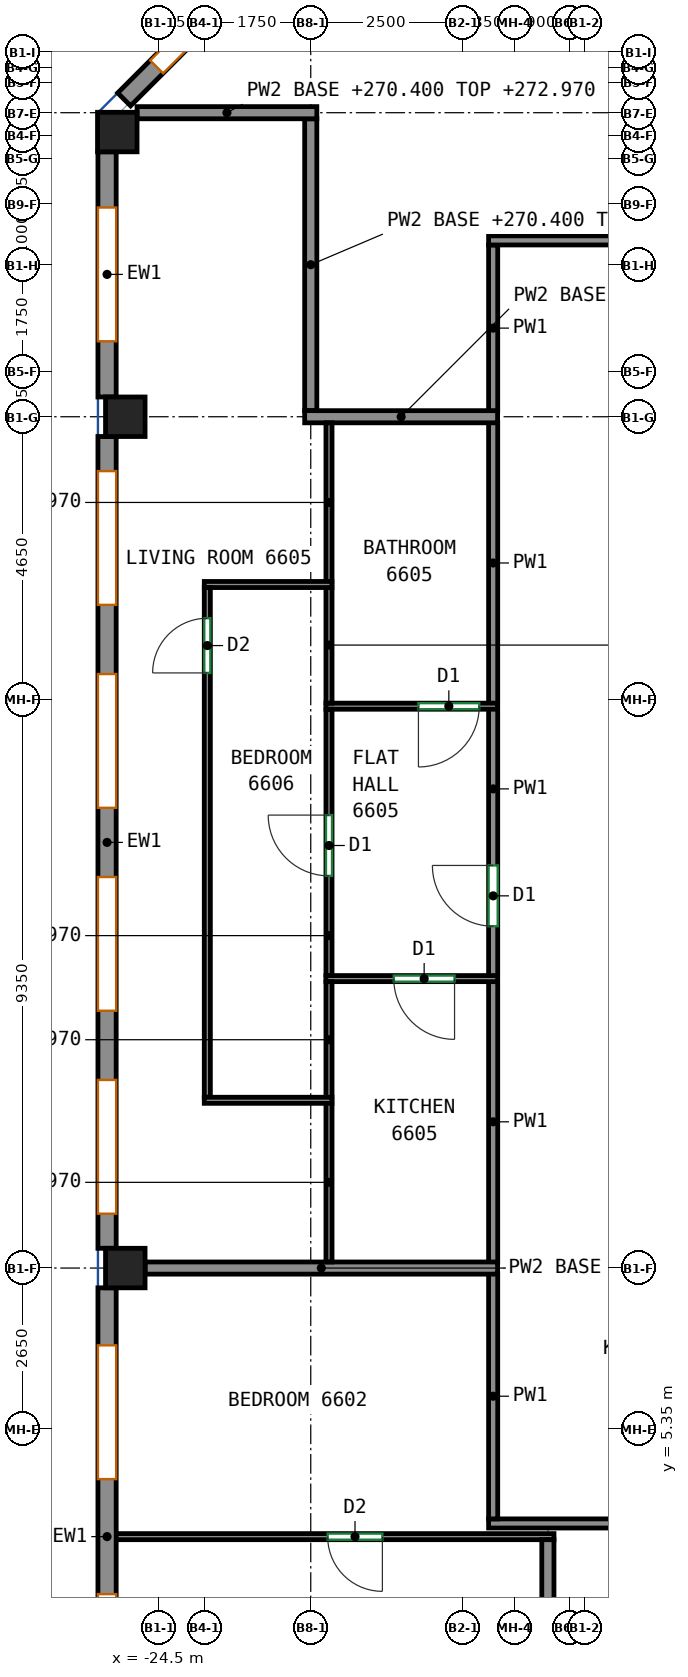
"""IFC4 building model, lengths in metres.
Left out: names, types, materials, properties, quantities, classifications, styles, units other than length and angle.
Written with IfcOpenShell. Run it as: python <this file> out.ifc"""

import sys

from ifc_helpers import new_model, si_unit, direction, frame, frame_2d, origin, origin_2d, place, context, subcontext, project, spatial, rectangle, extrude, source, transform, mapped, element, fill, save


model = new_model("IFC4")
c1 = context("Model", 3, precision=1e-05, world=origin(), true_north=direction((0.0, 1.0)))
c2 = subcontext(c1, "Body", "Model", "MODEL_VIEW")
j1 = project(units=[si_unit("LENGTHUNIT", "METRE"), si_unit("PLANEANGLEUNIT", "RADIAN")], contexts=[c1])
p1 = place(None, origin())
s1 = spatial("IfcSite", under=j1, at=p1, CompositionType="ELEMENT")
p2 = place(p1, origin())
s2 = spatial("IfcBuilding", under=s1, at=p2, CompositionType="ELEMENT")
p3 = place(p2, frame((0.0, 0.0, 270.4)))
s3 = spatial("IfcBuildingStorey", under=s2, at=p3, CompositionType="ELEMENT", Elevation=270.4)
m1 = source(origin(), c2, "Body", "SweptSolid", [
    extrude(rectangle(XDim=0.65, YDim=0.65, at=origin_2d()), origin(), (0.0, 0.0, 1.0), 3.12),
])
for number, where, z_axis, x_axis in (
    (1, (-25.182, 26.682, 0.0), (0.0, 0.0, 1.0), (1.0, 0.0, 0.0)),
    (2, (-25.05, 8.0, 0.0), (0.0, 0.0, 1.0), (1.0, 0.0, 0.0)),
    (3, (-25.05, 22.0, 0.0), (0.0, 0.0, 1.0), (1.0, 0.0, 0.0)),
):
    element("IfcColumn", number, at=place(p3, frame(where, z_axis=z_axis, x_axis=x_axis)), inside=s3, PredefinedType="COLUMN", context=c2, shape_type="MappedRepresentation", body=[
        mapped(m1, transform((0.0, 0.0, 0.0))),
    ])
m2 = source(origin(), c2, "Body", "SweptSolid", [
    extrude(rectangle(XDim=3.712, YDim=0.3, at=frame_2d((1.856, 0.0))), origin(), (0.0, 0.0, 1.0), 3.12),
])
p4 = place(p3, frame((-22.444, 29.844, 0.0), z_axis=(0.0, 0.0, 1.0), x_axis=(-0.707106781187, -0.707106781187, 0.0)))
e4 = element("IfcWall", 4, at=p4, inside=s3, PredefinedType="SOLIDWALL", context=c2, shape_type="MappedRepresentation", body=[
    mapped(m2, transform((0.0, 0.0, 0.0))),
])
p5 = place(p4, frame((0.756, 0.0, 0.8)))
e5 = element("IfcOpeningElement", 5, at=p5, cuts=e4, PredefinedType="OPENING", context=c2, shape_type="SweptSolid", body=[
    extrude(rectangle(XDim=2.2, YDim=2.05, at=frame_2d((1.1, 1.025))), frame((0.0, 0.16, 0.0), z_axis=(0.0, -1.0, 0.0), x_axis=(1.0, 0.0, 0.0)), (0.0, 0.0, 1.0), 0.32),
])
m3 = source(origin(), c2, "Body", "SweptSolid", [
    extrude(rectangle(XDim=4.032, YDim=0.3, at=frame_2d((2.016, 0.0))), origin(), (0.0, 0.0, 1.0), 3.12),
])
p6 = place(p3, frame((-25.35, 26.357, 0.0), z_axis=(0.0, 0.0, 1.0), x_axis=(0.0, -1.0, 0.0)))
e6 = element("IfcWall", 6, at=p6, inside=s3, PredefinedType="SOLIDWALL", context=c2, shape_type="MappedRepresentation", body=[
    mapped(m3, transform((0.0, 0.0, 0.0))),
])
p7 = place(p6, frame((0.916, 0.0, 0.8)))
e7 = element("IfcOpeningElement", 7, at=p7, cuts=e6, PredefinedType="OPENING", context=c2, shape_type="SweptSolid", body=[
    extrude(rectangle(XDim=2.2, YDim=2.05, at=frame_2d((1.1, 1.025))), frame((0.0, 0.16, 0.0), z_axis=(0.0, -1.0, 0.0), x_axis=(1.0, 0.0, 0.0)), (0.0, 0.0, 1.0), 0.32),
])
m4 = source(origin(), c2, "Body", "SweptSolid", [
    extrude(rectangle(XDim=13.35, YDim=0.3, at=frame_2d((6.675, 0.0))), origin(), (0.0, 0.0, 1.0), 3.12),
])
p8 = place(p3, frame((-25.35, 21.675, 0.0), z_axis=(0.0, 0.0, 1.0), x_axis=(0.0, -1.0, 0.0)))
e8 = element("IfcWall", 8, at=p8, inside=s3, PredefinedType="SOLIDWALL", context=c2, shape_type="MappedRepresentation", body=[
    mapped(m4, transform((0.0, 0.0, 0.0))),
])
p9 = place(p8, frame((0.569, 0.0, 0.8)))
e9 = element("IfcOpeningElement", 9, at=p9, cuts=e8, PredefinedType="OPENING", context=c2, shape_type="SweptSolid", body=[
    extrude(rectangle(XDim=2.2, YDim=2.05, at=frame_2d((1.1, 1.025))), frame((0.0, 0.16, 0.0), z_axis=(0.0, -1.0, 0.0), x_axis=(1.0, 0.0, 0.0)), (0.0, 0.0, 1.0), 0.32),
])
p10 = place(p8, frame((3.906, 0.0, 0.8)))
e10 = element("IfcOpeningElement", 10, at=p10, cuts=e8, PredefinedType="OPENING", context=c2, shape_type="SweptSolid", body=[
    extrude(rectangle(XDim=2.2, YDim=2.05, at=frame_2d((1.1, 1.025))), frame((0.0, 0.16, 0.0), z_axis=(0.0, -1.0, 0.0), x_axis=(1.0, 0.0, 0.0)), (0.0, 0.0, 1.0), 0.32),
])
p11 = place(p8, frame((7.244, 0.0, 0.8)))
e11 = element("IfcOpeningElement", 11, at=p11, cuts=e8, PredefinedType="OPENING", context=c2, shape_type="SweptSolid", body=[
    extrude(rectangle(XDim=2.2, YDim=2.05, at=frame_2d((1.1, 1.025))), frame((0.0, 0.16, 0.0), z_axis=(0.0, -1.0, 0.0), x_axis=(1.0, 0.0, 0.0)), (0.0, 0.0, 1.0), 0.32),
])
p12 = place(p8, frame((10.581, 0.0, 0.8)))
e12 = element("IfcOpeningElement", 12, at=p12, cuts=e8, PredefinedType="OPENING", context=c2, shape_type="SweptSolid", body=[
    extrude(rectangle(XDim=2.2, YDim=2.05, at=frame_2d((1.1, 1.025))), frame((0.0, 0.16, 0.0), z_axis=(0.0, -1.0, 0.0), x_axis=(1.0, 0.0, 0.0)), (0.0, 0.0, 1.0), 0.32),
])
m5 = source(origin(), c2, "Body", "SweptSolid", [
    extrude(rectangle(XDim=8.183, YDim=0.3, at=frame_2d((4.092, 0.0))), origin(), (0.0, 0.0, 1.0), 3.12),
])
p13 = place(p3, frame((-25.35, 7.675, 0.0), z_axis=(0.0, 0.0, 1.0), x_axis=(0.0, -1.0, 0.0)))
e13 = element("IfcWall", 13, at=p13, inside=s3, PredefinedType="SOLIDWALL", context=c2, shape_type="MappedRepresentation", body=[
    mapped(m5, transform((0.0, 0.0, 0.0))),
])
p14 = place(p13, frame((0.946, 0.0, 0.8)))
e14 = element("IfcOpeningElement", 14, at=p14, cuts=e13, PredefinedType="OPENING", context=c2, shape_type="SweptSolid", body=[
    extrude(rectangle(XDim=2.2, YDim=2.05, at=frame_2d((1.1, 1.025))), frame((0.0, 0.16, 0.0), z_axis=(0.0, -1.0, 0.0), x_axis=(1.0, 0.0, 0.0)), (0.0, 0.0, 1.0), 0.32),
])
p15 = place(p13, frame((5.037, 0.0, 0.8)))
e15 = element("IfcOpeningElement", 15, at=p15, cuts=e13, PredefinedType="OPENING", context=c2, shape_type="SweptSolid", body=[
    extrude(rectangle(XDim=2.2, YDim=2.05, at=frame_2d((1.1, 1.025))), frame((0.0, 0.16, 0.0), z_axis=(0.0, -1.0, 0.0), x_axis=(1.0, 0.0, 0.0)), (0.0, 0.0, 1.0), 0.32),
])
p16 = place(p3, frame((-19.075, 3.8, 0.0), z_axis=(0.0, 0.0, 1.0), x_axis=(1.0, 0.0, 0.0)))
e16 = element("IfcWall", 16, at=p16, inside=s3, PredefinedType="PARTITIONING", context=c2, shape_type="SweptSolid", body=[
    extrude(rectangle(XDim=4.89, YDim=0.15, at=frame_2d((2.445, 0.0))), origin(), (0.0, 0.0, 1.0), 3.12),
])
p17 = place(p3, frame((-19.0, 3.875, 0.0), z_axis=(0.0, 0.0, 1.0), x_axis=(0.0, 1.0, 0.0)))
e17 = element("IfcWall", 17, at=p17, inside=s3, PredefinedType="PARTITIONING", context=c2, shape_type="SweptSolid", body=[
    extrude(rectangle(XDim=4.035, YDim=0.15, at=frame_2d((2.018, 0.0))), origin(), (0.0, 0.0, 1.0), 3.12),
])
p18 = place(p3, frame((-19.0, 22.09, 0.0), z_axis=(0.0, 0.0, 1.0), x_axis=(0.0, 1.0, 0.0)))
e18 = element("IfcWall", 18, at=p18, inside=s3, PredefinedType="PARTITIONING", context=c2, shape_type="SweptSolid", body=[
    extrude(rectangle(XDim=2.735, YDim=0.15, at=frame_2d((1.367, 0.0))), origin(), (0.0, 0.0, 1.0), 3.12),
])
p19 = place(p3, frame((-19.075, 24.9, 0.0), z_axis=(0.0, 0.0, 1.0), x_axis=(1.0, 0.0, 0.0)))
e19 = element("IfcWall", 19, at=p19, inside=s3, PredefinedType="PARTITIONING", context=c2, shape_type="SweptSolid", body=[
    extrude(rectangle(XDim=39.75, YDim=0.15, at=frame_2d((19.875, 0.0))), origin(), (0.0, 0.0, 1.0), 3.12),
])
p20 = place(p19, frame((8.674, 0.0, 0.0)))
e20 = element("IfcOpeningElement", 20, at=p20, cuts=e19, PredefinedType="OPENING", context=c2, shape_type="SweptSolid", body=[
    extrude(rectangle(XDim=0.9, YDim=2.1, at=frame_2d((0.45, 1.05))), frame((0.0, 0.085, 0.0), z_axis=(0.0, -1.0, 0.0), x_axis=(1.0, 0.0, 0.0)), (0.0, 0.0, 1.0), 0.17),
])
p21 = place(p19, frame((13.778, 0.0, 0.0)))
e21 = element("IfcOpeningElement", 21, at=p21, cuts=e19, PredefinedType="OPENING", context=c2, shape_type="SweptSolid", body=[
    extrude(rectangle(XDim=0.9, YDim=2.1, at=frame_2d((0.45, 1.05))), frame((0.0, 0.085, 0.0), z_axis=(0.0, -1.0, 0.0), x_axis=(1.0, 0.0, 0.0)), (0.0, 0.0, 1.0), 0.17),
])
p22 = place(p3, frame((-19.0, 8.09, 0.0), z_axis=(0.0, 0.0, 1.0), x_axis=(0.0, 1.0, 0.0)))
e22 = element("IfcWall", 22, at=p22, inside=s3, PredefinedType="PARTITIONING", context=c2, shape_type="SweptSolid", body=[
    extrude(rectangle(XDim=4.63, YDim=0.15, at=frame_2d((2.315, 0.0))), origin(), (0.0, 0.0, 1.0), 3.12),
])
p23 = place(p3, frame((-19.0, 12.8, 0.0), z_axis=(0.0, 0.0, 1.0), x_axis=(0.0, 1.0, 0.0)))
e23 = element("IfcWall", 23, at=p23, inside=s3, PredefinedType="PARTITIONING", context=c2, shape_type="SweptSolid", body=[
    extrude(rectangle(XDim=4.4, YDim=0.15, at=frame_2d((2.2, 0.0))), origin(), (0.0, 0.0, 1.0), 3.12),
])
p24 = place(p23, frame((0.821, 0.0, 0.0)))
e24 = element("IfcOpeningElement", 24, at=p24, cuts=e23, PredefinedType="OPENING", context=c2, shape_type="SweptSolid", body=[
    extrude(rectangle(XDim=1.0, YDim=2.1, at=frame_2d((0.5, 1.05))), frame((0.0, 0.085, 0.0), z_axis=(0.0, -1.0, 0.0), x_axis=(1.0, 0.0, 0.0)), (0.0, 0.0, 1.0), 0.17),
])
p25 = place(p3, frame((-19.0, 17.28, 0.0), z_axis=(0.0, 0.0, 1.0), x_axis=(0.0, 1.0, 0.0)))
e25 = element("IfcWall", 25, at=p25, inside=s3, PredefinedType="PARTITIONING", context=c2, shape_type="SweptSolid", body=[
    extrude(rectangle(XDim=4.63, YDim=0.15, at=frame_2d((2.315, 0.0))), origin(), (0.0, 0.0, 1.0), 3.12),
])
p26 = place(p3, frame((-18.0, 3.583, 0.0), z_axis=(0.0, 0.0, 1.0), x_axis=(-1.0, 0.0, 0.0)))
e26 = element("IfcWall", 26, at=p26, inside=s3, PredefinedType="PARTITIONING", context=c2, shape_type="SweptSolid", body=[
    extrude(rectangle(XDim=7.25, YDim=0.1, at=frame_2d((3.625, 0.0))), origin(), (0.0, 0.0, 1.0), 3.12),
])
p27 = place(p26, frame((2.822, 0.0, 0.0)))
e27 = element("IfcOpeningElement", 27, at=p27, cuts=e26, PredefinedType="OPENING", context=c2, shape_type="SweptSolid", body=[
    extrude(rectangle(XDim=0.9, YDim=2.1, at=frame_2d((0.45, 1.05))), frame((0.0, 0.06, 0.0), z_axis=(0.0, -1.0, 0.0), x_axis=(1.0, 0.0, 0.0)), (0.0, 0.0, 1.0), 0.12),
])
p28 = place(p3, frame((-18.1, -3.148, 0.0), z_axis=(0.0, 0.0, 1.0), x_axis=(0.0, 1.0, 0.0)))
e28 = element("IfcWall", 28, at=p28, inside=s3, PredefinedType="PARTITIONING", context=c2, shape_type="SweptSolid", body=[
    extrude(rectangle(XDim=6.681, YDim=0.2, at=frame_2d((3.34, 0.0))), origin(), (0.0, 0.0, 1.0), 3.12),
])
p29 = place(p3, frame((-24.725, 8.0, 0.0), z_axis=(0.0, 0.0, 1.0), x_axis=(1.0, 0.0, 0.0)))
e29 = element("IfcWall", 29, at=p29, inside=s3, PredefinedType="PARTITIONING", context=c2, shape_type="SweptSolid", body=[
    extrude(rectangle(XDim=5.798, YDim=0.2, at=frame_2d((2.899, 0.0))), origin(), (0.0, 0.0, 1.0), 2.57),
])
p30 = place(p3, frame((-22.0, 22.1, 0.0), z_axis=(0.0, 0.0, 1.0), x_axis=(0.0, 1.0, 0.0)))
e30 = element("IfcWall", 30, at=p30, inside=s3, PredefinedType="PARTITIONING", context=c2, shape_type="SweptSolid", body=[
    extrude(rectangle(XDim=4.8, YDim=0.2, at=frame_2d((2.4, 0.0))), origin(), (0.0, 0.0, 1.0), 2.57),
])
p31 = place(p3, frame((-24.857, 27.0, 0.0), z_axis=(0.0, 0.0, 1.0), x_axis=(1.0, 0.0, 0.0)))
e31 = element("IfcWall", 31, at=p31, inside=s3, PredefinedType="PARTITIONING", context=c2, shape_type="SweptSolid", body=[
    extrude(rectangle(XDim=2.957, YDim=0.2, at=frame_2d((1.479, 0.0))), origin(), (0.0, 0.0, 1.0), 2.57),
])
p32 = place(p3, frame((-22.1, 22.0, 0.0), z_axis=(0.0, 0.0, 1.0), x_axis=(1.0, 0.0, 0.0)))
e32 = element("IfcWall", 32, at=p32, inside=s3, PredefinedType="PARTITIONING", context=c2, shape_type="SweptSolid", body=[
    extrude(rectangle(XDim=3.173, YDim=0.2, at=frame_2d((1.586, 0.0))), origin(), (0.0, 0.0, 1.0), 2.57),
])
p33 = place(p3, frame((-18.927, 12.76, 0.0), z_axis=(0.0, 0.0, 1.0), x_axis=(-1.0, 0.0, 0.0)))
e33 = element("IfcWall", 33, at=p33, inside=s3, PredefinedType="PARTITIONING", context=c2, shape_type="SweptSolid", body=[
    extrude(rectangle(XDim=2.823, YDim=0.1, at=frame_2d((1.412, 0.0))), origin(), (0.0, 0.0, 1.0), 3.12),
])
p34 = place(p33, frame((0.708, 0.0, 0.0)))
e34 = element("IfcOpeningElement", 34, at=p34, cuts=e33, PredefinedType="OPENING", context=c2, shape_type="SweptSolid", body=[
    extrude(rectangle(XDim=1.0, YDim=2.1, at=frame_2d((0.5, 1.05))), frame((0.0, 0.06, 0.0), z_axis=(0.0, -1.0, 0.0), x_axis=(1.0, 0.0, 0.0)), (0.0, 0.0, 1.0), 0.12),
])
p35 = place(p3, frame((-21.7, 8.1, 0.0), z_axis=(0.0, 0.0, 1.0), x_axis=(0.0, 1.0, 0.0)))
e35 = element("IfcWall", 35, at=p35, inside=s3, PredefinedType="PARTITIONING", context=c2, shape_type="SweptSolid", body=[
    extrude(rectangle(XDim=2.619, YDim=0.1, at=frame_2d((1.31, 0.0))), origin(), (0.0, 0.0, 1.0), 2.57),
])
p36 = place(p3, frame((-21.7, 10.8, 0.0), z_axis=(0.0, 0.0, 1.0), x_axis=(0.0, 1.0, 0.0)))
e36 = element("IfcWall", 36, at=p36, inside=s3, PredefinedType="PARTITIONING", context=c2, shape_type="SweptSolid", body=[
    extrude(rectangle(XDim=1.91, YDim=0.1, at=frame_2d((0.955, 0.0))), origin(), (0.0, 0.0, 1.0), 2.57),
])
p37 = place(p3, frame((-18.927, 17.24, 0.0), z_axis=(0.0, 0.0, 1.0), x_axis=(-1.0, 0.0, 0.0)))
e37 = element("IfcWall", 37, at=p37, inside=s3, PredefinedType="PARTITIONING", context=c2, shape_type="SweptSolid", body=[
    extrude(rectangle(XDim=2.823, YDim=0.1, at=frame_2d((1.412, 0.0))), origin(), (0.0, 0.0, 1.0), 3.12),
])
p38 = place(p37, frame((0.302, 0.0, 0.0)))
e38 = element("IfcOpeningElement", 38, at=p38, cuts=e37, PredefinedType="OPENING", context=c2, shape_type="SweptSolid", body=[
    extrude(rectangle(XDim=1.0, YDim=2.1, at=frame_2d((0.5, 1.05))), frame((0.0, 0.06, 0.0), z_axis=(0.0, -1.0, 0.0), x_axis=(1.0, 0.0, 0.0)), (0.0, 0.0, 1.0), 0.12),
])
p39 = place(p3, frame((-21.7, 12.81, 0.0), z_axis=(0.0, 0.0, 1.0), x_axis=(0.0, 1.0, 0.0)))
e39 = element("IfcWall", 39, at=p39, inside=s3, PredefinedType="PARTITIONING", context=c2, shape_type="SweptSolid", body=[
    extrude(rectangle(XDim=4.38, YDim=0.1, at=frame_2d((2.19, 0.0))), origin(), (0.0, 0.0, 1.0), 2.57),
])
p40 = place(p39, frame((1.639, 0.0, 0.0)))
e40 = element("IfcOpeningElement", 40, at=p40, cuts=e39, PredefinedType="OPENING", context=c2, shape_type="SweptSolid", body=[
    extrude(rectangle(XDim=1.0, YDim=2.1, at=frame_2d((0.5, 1.05))), frame((0.0, 0.06, 0.0), z_axis=(0.0, -1.0, 0.0), x_axis=(1.0, 0.0, 0.0)), (0.0, 0.0, 1.0), 0.12),
])
p41 = place(p3, frame((-21.7, 19.281, 0.0), z_axis=(0.0, 0.0, 1.0), x_axis=(0.0, 1.0, 0.0)))
e41 = element("IfcWall", 41, at=p41, inside=s3, PredefinedType="PARTITIONING", context=c2, shape_type="SweptSolid", body=[
    extrude(rectangle(XDim=2.619, YDim=0.1, at=frame_2d((1.31, 0.0))), origin(), (0.0, 0.0, 1.0), 2.57),
])
p42 = place(p3, frame((-21.7, 17.29, 0.0), z_axis=(0.0, 0.0, 1.0), x_axis=(0.0, 1.0, 0.0)))
e42 = element("IfcWall", 42, at=p42, inside=s3, PredefinedType="PARTITIONING", context=c2, shape_type="SweptSolid", body=[
    extrude(rectangle(XDim=1.91, YDim=0.1, at=frame_2d((0.955, 0.0))), origin(), (0.0, 0.0, 1.0), 2.57),
])
p43 = place(p3, frame((-23.751, 19.241, 0.0), z_axis=(0.0, 0.0, 1.0), x_axis=(1.0, 0.0, 0.0)))
e43 = element("IfcWall", 43, at=p43, inside=s3, PredefinedType="PARTITIONING", context=c2, shape_type="SweptSolid", body=[
    extrude(rectangle(XDim=2.099, YDim=0.1, at=frame_2d((1.049, 0.0))), origin(), (0.0, 0.0, 1.0), 3.12),
])
p44 = place(p3, frame((-23.701, 10.809, 0.0), z_axis=(0.0, 0.0, 1.0), x_axis=(0.0, 1.0, 0.0)))
e44 = element("IfcWall", 44, at=p44, inside=s3, PredefinedType="PARTITIONING", context=c2, shape_type="SweptSolid", body=[
    extrude(rectangle(XDim=8.382, YDim=0.1, at=frame_2d((4.191, 0.0))), origin(), (0.0, 0.0, 1.0), 3.12),
])
p45 = place(p44, frame((6.978, 0.0, 0.0)))
e45 = element("IfcOpeningElement", 45, at=p45, cuts=e44, PredefinedType="OPENING", context=c2, shape_type="SweptSolid", body=[
    extrude(rectangle(XDim=0.9, YDim=2.1, at=frame_2d((0.45, 1.05))), frame((0.0, 0.06, 0.0), z_axis=(0.0, -1.0, 0.0), x_axis=(1.0, 0.0, 0.0)), (0.0, 0.0, 1.0), 0.12),
])
p46 = place(p3, frame((-21.652, 10.759, 0.0), z_axis=(0.0, 0.0, 1.0), x_axis=(-1.0, 0.0, 0.0)))
e46 = element("IfcWall", 46, at=p46, inside=s3, PredefinedType="PARTITIONING", context=c2, shape_type="SweptSolid", body=[
    extrude(rectangle(XDim=2.099, YDim=0.1, at=frame_2d((1.049, 0.0))), origin(), (0.0, 0.0, 1.0), 3.12),
])
p47 = place(p5, origin())
e47 = element("IfcWindow", 47, at=p47, inside=s3, PartitioningType="SINGLE_PANEL", PredefinedType="WINDOW", context=c2, shape_type="SweptSolid", body=[
    extrude(rectangle(XDim=2.2, YDim=2.05, at=frame_2d((1.1, 1.025))), frame((0.0, 0.03, 0.0), z_axis=(0.0, -1.0, 0.0), x_axis=(1.0, 0.0, 0.0)), (0.0, 0.0, 1.0), 0.06),
])
fill(e5, e47)
p48 = place(p7, origin())
e48 = element("IfcWindow", 48, at=p48, inside=s3, PartitioningType="SINGLE_PANEL", PredefinedType="WINDOW", context=c2, shape_type="SweptSolid", body=[
    extrude(rectangle(XDim=2.2, YDim=2.05, at=frame_2d((1.1, 1.025))), frame((0.0, 0.03, 0.0), z_axis=(0.0, -1.0, 0.0), x_axis=(1.0, 0.0, 0.0)), (0.0, 0.0, 1.0), 0.06),
])
fill(e7, e48)
p49 = place(p9, origin())
e49 = element("IfcWindow", 49, at=p49, inside=s3, PartitioningType="SINGLE_PANEL", PredefinedType="WINDOW", context=c2, shape_type="SweptSolid", body=[
    extrude(rectangle(XDim=2.2, YDim=2.05, at=frame_2d((1.1, 1.025))), frame((0.0, 0.03, 0.0), z_axis=(0.0, -1.0, 0.0), x_axis=(1.0, 0.0, 0.0)), (0.0, 0.0, 1.0), 0.06),
])
fill(e9, e49)
p50 = place(p10, origin())
e50 = element("IfcWindow", 50, at=p50, inside=s3, PartitioningType="SINGLE_PANEL", PredefinedType="WINDOW", context=c2, shape_type="SweptSolid", body=[
    extrude(rectangle(XDim=2.2, YDim=2.05, at=frame_2d((1.1, 1.025))), frame((0.0, 0.03, 0.0), z_axis=(0.0, -1.0, 0.0), x_axis=(1.0, 0.0, 0.0)), (0.0, 0.0, 1.0), 0.06),
])
fill(e10, e50)
p51 = place(p11, origin())
e51 = element("IfcWindow", 51, at=p51, inside=s3, PartitioningType="SINGLE_PANEL", PredefinedType="WINDOW", context=c2, shape_type="SweptSolid", body=[
    extrude(rectangle(XDim=2.2, YDim=2.05, at=frame_2d((1.1, 1.025))), frame((0.0, 0.03, 0.0), z_axis=(0.0, -1.0, 0.0), x_axis=(1.0, 0.0, 0.0)), (0.0, 0.0, 1.0), 0.06),
])
fill(e11, e51)
p52 = place(p12, origin())
e52 = element("IfcWindow", 52, at=p52, inside=s3, PartitioningType="SINGLE_PANEL", PredefinedType="WINDOW", context=c2, shape_type="SweptSolid", body=[
    extrude(rectangle(XDim=2.2, YDim=2.05, at=frame_2d((1.1, 1.025))), frame((0.0, 0.03, 0.0), z_axis=(0.0, -1.0, 0.0), x_axis=(1.0, 0.0, 0.0)), (0.0, 0.0, 1.0), 0.06),
])
fill(e12, e52)
p53 = place(p14, origin())
e53 = element("IfcWindow", 53, at=p53, inside=s3, PartitioningType="SINGLE_PANEL", PredefinedType="WINDOW", context=c2, shape_type="SweptSolid", body=[
    extrude(rectangle(XDim=2.2, YDim=2.05, at=frame_2d((1.1, 1.025))), frame((0.0, 0.03, 0.0), z_axis=(0.0, -1.0, 0.0), x_axis=(1.0, 0.0, 0.0)), (0.0, 0.0, 1.0), 0.06),
])
fill(e14, e53)
p54 = place(p15, origin())
e54 = element("IfcWindow", 54, at=p54, inside=s3, PartitioningType="SINGLE_PANEL", PredefinedType="WINDOW", context=c2, shape_type="SweptSolid", body=[
    extrude(rectangle(XDim=2.2, YDim=2.05, at=frame_2d((1.1, 1.025))), frame((0.0, 0.03, 0.0), z_axis=(0.0, -1.0, 0.0), x_axis=(1.0, 0.0, 0.0)), (0.0, 0.0, 1.0), 0.06),
])
fill(e15, e54)
p55 = place(p27, origin())
e55 = element("IfcDoor", 55, at=p55, inside=s3, OperationType="SINGLE_SWING_LEFT", PredefinedType="DOOR", context=c2, shape_type="SweptSolid", body=[
    extrude(rectangle(XDim=0.9, YDim=2.1, at=frame_2d((0.45, 1.05))), frame((0.0, 0.025, 0.0), z_axis=(0.0, -1.0, 0.0), x_axis=(1.0, 0.0, 0.0)), (0.0, 0.0, 1.0), 0.05),
])
fill(e27, e55)
p56 = place(p34, origin())
e56 = element("IfcDoor", 56, at=p56, inside=s3, OperationType="SINGLE_SWING_LEFT", PredefinedType="DOOR", context=c2, shape_type="SweptSolid", body=[
    extrude(rectangle(XDim=1.0, YDim=2.1, at=frame_2d((0.5, 1.05))), frame((0.0, 0.025, 0.0), z_axis=(0.0, -1.0, 0.0), x_axis=(1.0, 0.0, 0.0)), (0.0, 0.0, 1.0), 0.05),
])
fill(e34, e56)
p57 = place(p24, origin())
e57 = element("IfcDoor", 57, at=p57, inside=s3, OperationType="SINGLE_SWING_RIGHT", PredefinedType="DOOR", context=c2, shape_type="SweptSolid", body=[
    extrude(rectangle(XDim=1.0, YDim=2.1, at=frame_2d((0.5, 1.05))), frame((0.0, 0.025, 0.0), z_axis=(0.0, -1.0, 0.0), x_axis=(1.0, 0.0, 0.0)), (0.0, 0.0, 1.0), 0.05),
])
fill(e24, e57)
p58 = place(p40, origin())
e58 = element("IfcDoor", 58, at=p58, inside=s3, OperationType="SINGLE_SWING_RIGHT", PredefinedType="DOOR", context=c2, shape_type="SweptSolid", body=[
    extrude(rectangle(XDim=1.0, YDim=2.1, at=frame_2d((0.5, 1.05))), frame((0.0, 0.025, 0.0), z_axis=(0.0, -1.0, 0.0), x_axis=(1.0, 0.0, 0.0)), (0.0, 0.0, 1.0), 0.05),
])
fill(e40, e58)
p59 = place(p38, origin())
e59 = element("IfcDoor", 59, at=p59, inside=s3, OperationType="SINGLE_SWING_RIGHT", PredefinedType="DOOR", context=c2, shape_type="SweptSolid", body=[
    extrude(rectangle(XDim=1.0, YDim=2.1, at=frame_2d((0.5, 1.05))), frame((0.0, 0.025, 0.0), z_axis=(0.0, -1.0, 0.0), x_axis=(1.0, 0.0, 0.0)), (0.0, 0.0, 1.0), 0.05),
])
fill(e38, e59)
p60 = place(p45, origin())
e60 = element("IfcDoor", 60, at=p60, inside=s3, OperationType="SINGLE_SWING_LEFT", PredefinedType="DOOR", context=c2, shape_type="SweptSolid", body=[
    extrude(rectangle(XDim=0.9, YDim=2.1, at=frame_2d((0.45, 1.05))), frame((0.0, 0.025, 0.0), z_axis=(0.0, -1.0, 0.0), x_axis=(1.0, 0.0, 0.0)), (0.0, 0.0, 1.0), 0.05),
])
fill(e45, e60)
save(model, sys.argv[1])
